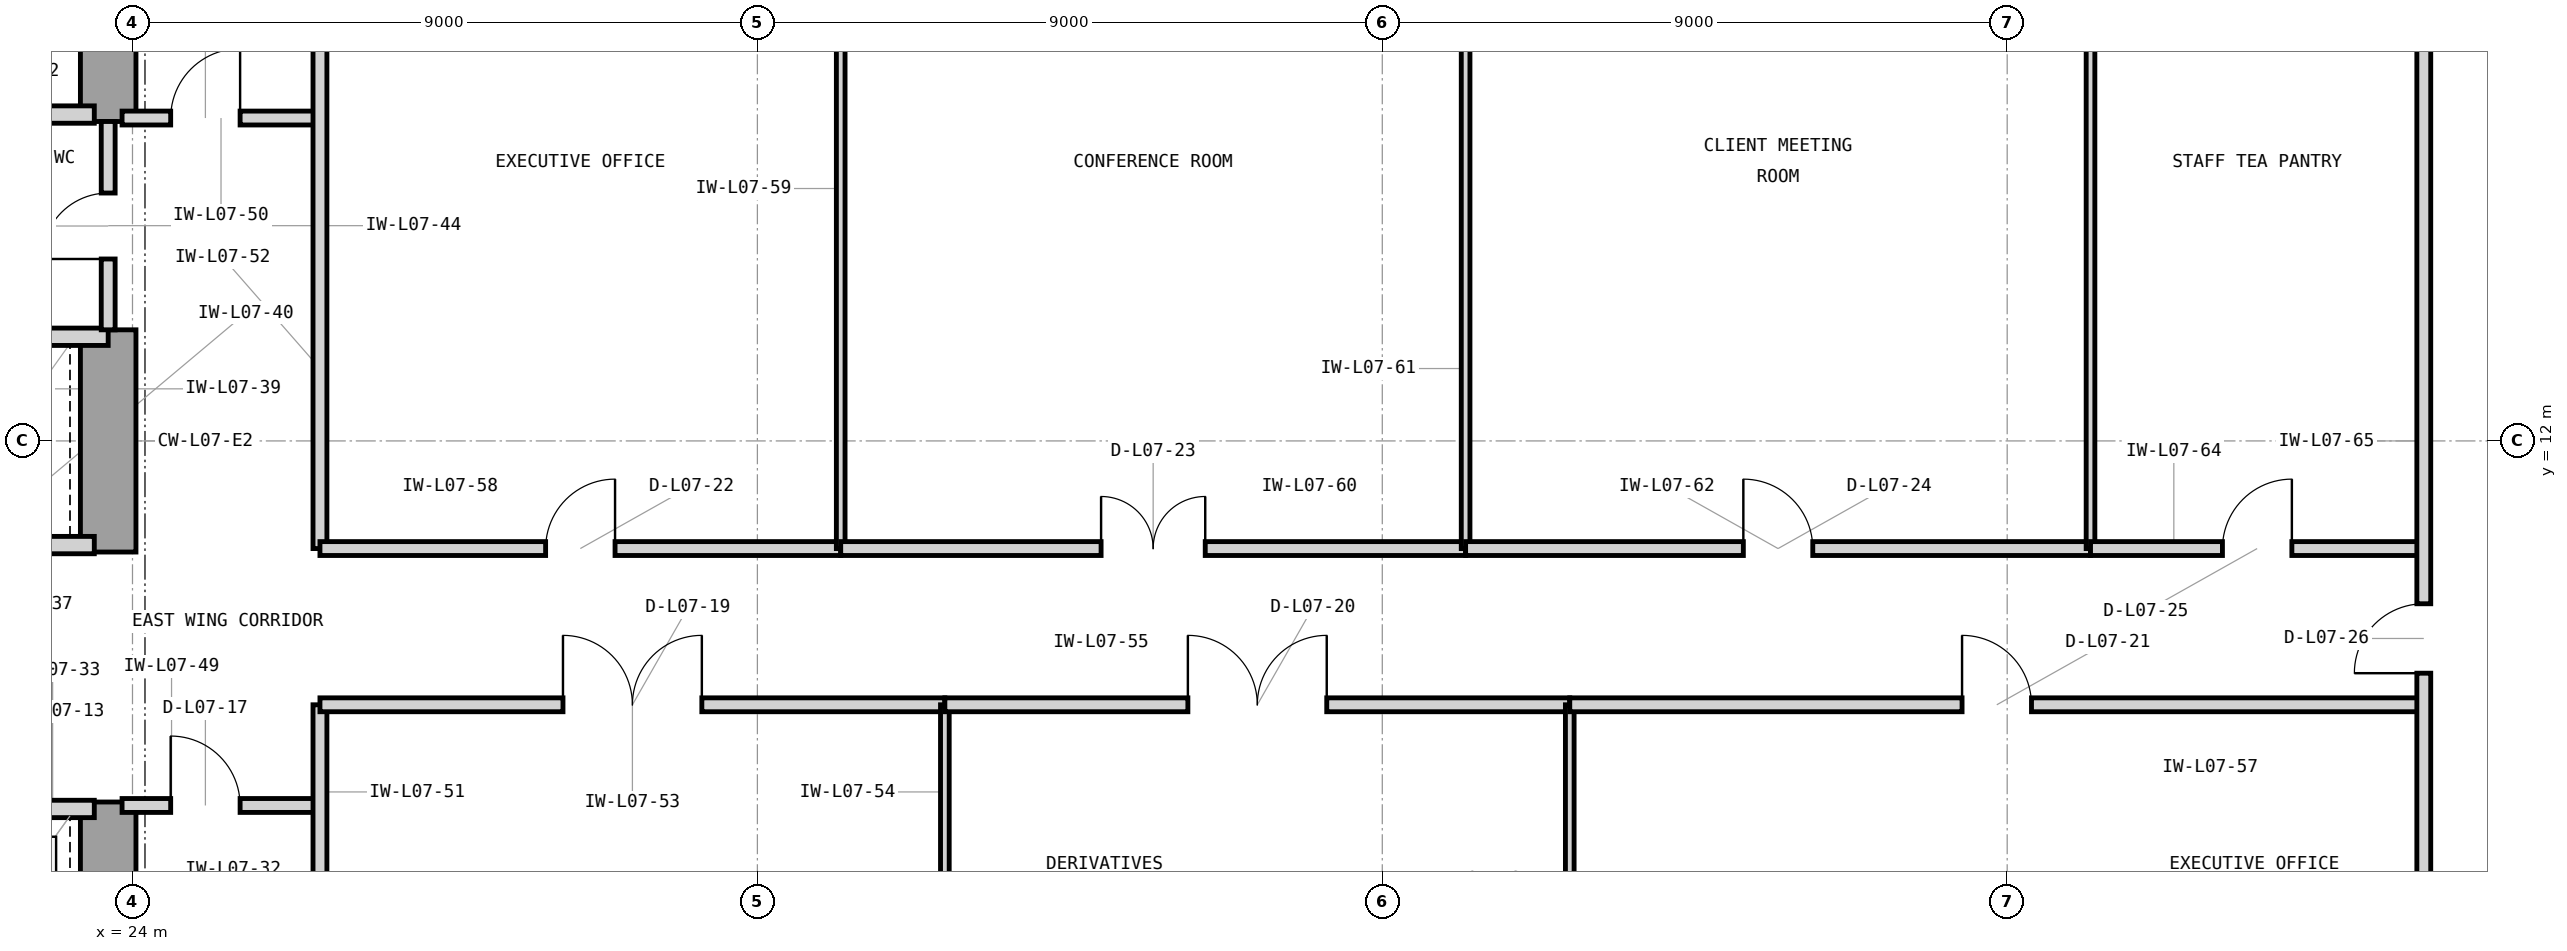
"""IFC4 building model, lengths in metres.
Left out: names, types, materials, properties, quantities, classifications, styles, units other than length and angle.
Written with IfcOpenShell. Run it as: python <this file> out.ifc"""

import sys

from ifc_helpers import new_model, si_unit, direction, frame, frame_2d, origin, place, context, subcontext, project, spatial, rectangle, extrude, element, fill, save


model = new_model("IFC4")
c1 = context("Model", 3, precision=1e-05, world=origin(), true_north=direction((0.0, 1.0)))
c2 = subcontext(c1, "Body", "Model", "MODEL_VIEW")
j1 = project(units=[si_unit("LENGTHUNIT", "METRE"), si_unit("PLANEANGLEUNIT", "RADIAN")], contexts=[c1])
p1 = place(None, origin())
s1 = spatial("IfcSite", under=j1, at=p1, CompositionType="ELEMENT")
p2 = place(p1, origin())
s2 = spatial("IfcBuilding", under=s1, at=p2, CompositionType="ELEMENT")
p3 = place(p2, frame((0.0, 0.0, 34.2)))
s3 = spatial("IfcBuildingStorey", under=s2, at=p3, CompositionType="ELEMENT", Elevation=34.2)
p4 = place(p3, frame((23.65, 3.75, 0.0), z_axis=(0.0, 0.0, 1.0), x_axis=(0.0, 1.0, 0.0)))
e1 = element("IfcWall", 1, at=p4, inside=s3, PredefinedType="SHEAR", context=c2, shape_type="SweptSolid", body=[
    extrude(rectangle(XDim=3.05, YDim=0.8, at=frame_2d((1.525, 0.0))), origin(), (0.0, 0.0, 1.0), 4.2),
])
p5 = place(p3, frame((23.65, 10.4, 0.0), z_axis=(0.0, 0.0, 1.0), x_axis=(0.0, 1.0, 0.0)))
e2 = element("IfcWall", 2, at=p5, inside=s3, PredefinedType="SHEAR", context=c2, shape_type="SweptSolid", body=[
    extrude(rectangle(XDim=3.2, YDim=0.8, at=frame_2d((1.6, 0.0))), origin(), (0.0, 0.0, 1.0), 4.2),
])
p6 = place(p3, frame((23.65, 16.6, 0.0), z_axis=(0.0, 0.0, 1.0), x_axis=(0.0, 1.0, 0.0)))
e3 = element("IfcWall", 3, at=p6, inside=s3, PredefinedType="SHEAR", context=c2, shape_type="SweptSolid", body=[
    extrude(rectangle(XDim=4.05, YDim=0.8, at=frame_2d((2.025, 0.0))), origin(), (0.0, 0.0, 1.0), 4.2),
])
p7 = place(p3, frame((21.05, 16.7, 0.0), z_axis=(0.0, 0.0, 1.0), x_axis=(1.0, 0.0, 0.0)))
e4 = element("IfcWall", 4, at=p7, inside=s3, PredefinedType="PARTITIONING", context=c2, shape_type="SweptSolid", body=[
    extrude(rectangle(XDim=2.4, YDim=0.25, at=frame_2d((1.2, 0.0))), origin(), (0.0, 0.0, 1.0), 3.426),
])
p8 = place(p3, frame((21.05, 6.7, 0.0), z_axis=(0.0, 0.0, 1.0), x_axis=(1.0, 0.0, 0.0)))
e5 = element("IfcWall", 5, at=p8, inside=s3, PredefinedType="PARTITIONING", context=c2, shape_type="SweptSolid", body=[
    extrude(rectangle(XDim=2.4, YDim=0.25, at=frame_2d((1.2, 0.0))), origin(), (0.0, 0.0, 1.0), 3.426),
])
p9 = place(p8, frame((0.48, 0.0, 0.0)))
e6 = element("IfcOpeningElement", 6, at=p9, cuts=e5, PredefinedType="OPENING", context=c2, shape_type="SweptSolid", body=[
    extrude(rectangle(XDim=1.15, YDim=2.25, at=frame_2d((0.575, 1.125))), frame((0.0, 0.135, 0.0), z_axis=(0.0, -1.0, 0.0), x_axis=(1.0, 0.0, 0.0)), (0.0, 0.0, 1.0), 0.27),
])
p10 = place(p3, frame((21.05, 10.5, 0.0), z_axis=(0.0, 0.0, 1.0), x_axis=(1.0, 0.0, 0.0)))
e7 = element("IfcWall", 7, at=p10, inside=s3, PredefinedType="PARTITIONING", context=c2, shape_type="SweptSolid", body=[
    extrude(rectangle(XDim=2.4, YDim=0.25, at=frame_2d((1.2, 0.0))), origin(), (0.0, 0.0, 1.0), 3.426),
])
p11 = place(p3, frame((14.7, 13.5, 0.0), z_axis=(0.0, 0.0, 1.0), x_axis=(1.0, 0.0, 0.0)))
e8 = element("IfcWall", 8, at=p11, inside=s3, PredefinedType="PARTITIONING", context=c2, shape_type="SweptSolid", body=[
    extrude(rectangle(XDim=8.95, YDim=0.25, at=frame_2d((4.475, 0.0))), origin(), (0.0, 0.0, 1.0), 3.426),
])
p12 = place(p3, frame((23.65, 13.6, 0.0), z_axis=(0.0, 0.0, 1.0), x_axis=(0.0, 1.0, 0.0)))
e9 = element("IfcWall", 9, at=p12, inside=s3, PredefinedType="PARTITIONING", context=c2, shape_type="SweptSolid", body=[
    extrude(rectangle(XDim=3.0, YDim=0.2, at=frame_2d((1.5, 0.0))), origin(), (0.0, 0.0, 1.0), 3.97),
])
p13 = place(p12, frame((1.02, 0.0, 0.0)))
e10 = element("IfcOpeningElement", 10, at=p13, cuts=e9, PredefinedType="OPENING", context=c2, shape_type="SweptSolid", body=[
    extrude(rectangle(XDim=0.95, YDim=2.1, at=frame_2d((0.475, 1.05))), frame((0.0, 0.11, 0.0), z_axis=(0.0, -1.0, 0.0), x_axis=(1.0, 0.0, 0.0)), (0.0, 0.0, 1.0), 0.22),
])
p14 = place(p3, frame((23.85, 6.75, 0.0), z_axis=(0.0, 0.0, 1.0), x_axis=(1.0, 0.0, 0.0)))
e11 = element("IfcWall", 11, at=p14, inside=s3, PredefinedType="PARTITIONING", context=c2, shape_type="SweptSolid", body=[
    extrude(rectangle(XDim=2.85, YDim=0.2, at=frame_2d((1.425, 0.0))), origin(), (0.0, 0.0, 1.0), 3.97),
])
p15 = place(p14, frame((0.7, 0.0, 0.0)))
e12 = element("IfcOpeningElement", 12, at=p15, cuts=e11, PredefinedType="OPENING", context=c2, shape_type="SweptSolid", body=[
    extrude(rectangle(XDim=1.0, YDim=2.15, at=frame_2d((0.5, 1.075))), frame((0.0, 0.11, 0.0), z_axis=(0.0, -1.0, 0.0), x_axis=(1.0, 0.0, 0.0)), (0.0, 0.0, 1.0), 0.22),
])
p16 = place(p3, frame((23.85, 16.65, 0.0), z_axis=(0.0, 0.0, 1.0), x_axis=(1.0, 0.0, 0.0)))
e13 = element("IfcWall", 13, at=p16, inside=s3, PredefinedType="PARTITIONING", context=c2, shape_type="SweptSolid", body=[
    extrude(rectangle(XDim=2.85, YDim=0.2, at=frame_2d((1.425, 0.0))), origin(), (0.0, 0.0, 1.0), 3.97),
])
p17 = place(p16, frame((0.7, 0.0, 0.0)))
e14 = element("IfcOpeningElement", 14, at=p17, cuts=e13, PredefinedType="OPENING", context=c2, shape_type="SweptSolid", body=[
    extrude(rectangle(XDim=1.0, YDim=2.15, at=frame_2d((0.5, 1.075))), frame((0.0, 0.11, 0.0), z_axis=(0.0, -1.0, 0.0), x_axis=(1.0, 0.0, 0.0)), (0.0, 0.0, 1.0), 0.22),
])
p18 = place(p3, frame((26.7, 3.18, 0.0), z_axis=(0.0, 0.0, 1.0), x_axis=(0.0, 1.0, 0.0)))
e15 = element("IfcWall", 15, at=p18, inside=s3, PredefinedType="PARTITIONING", context=c2, shape_type="SweptSolid", body=[
    extrude(rectangle(XDim=5.02, YDim=0.2, at=frame_2d((2.51, 0.0))), origin(), (0.0, 0.0, 1.0), 3.97),
])
p19 = place(p3, frame((26.7, 10.45, 0.0), z_axis=(0.0, 0.0, 1.0), x_axis=(0.0, 1.0, 0.0)))
e16 = element("IfcWall", 16, at=p19, inside=s3, PredefinedType="PARTITIONING", context=c2, shape_type="SweptSolid", body=[
    extrude(rectangle(XDim=10.37, YDim=0.2, at=frame_2d((5.185, 0.0))), origin(), (0.0, 0.0, 1.0), 3.97),
])
p20 = place(p3, frame((26.7, 8.2, 0.0), z_axis=(0.0, 0.0, 1.0), x_axis=(1.0, 0.0, 0.0)))
e17 = element("IfcWall", 17, at=p20, inside=s3, PredefinedType="PARTITIONING", context=c2, shape_type="SweptSolid", body=[
    extrude(rectangle(XDim=9.0, YDim=0.2, at=frame_2d((4.5, 0.0))), origin(), (0.0, 0.0, 1.0), 3.97),
])
p21 = place(p20, frame((3.5, 0.0, 0.0)))
e18 = element("IfcOpeningElement", 18, at=p21, cuts=e17, PredefinedType="OPENING", context=c2, shape_type="SweptSolid", body=[
    extrude(rectangle(XDim=2.0, YDim=2.5, at=frame_2d((1.0, 1.25))), frame((0.0, 0.11, 0.0), z_axis=(0.0, -1.0, 0.0), x_axis=(1.0, 0.0, 0.0)), (0.0, 0.0, 1.0), 0.22),
])
p22 = place(p3, frame((35.7, 3.18, 0.0), z_axis=(0.0, 0.0, 1.0), x_axis=(0.0, 1.0, 0.0)))
e19 = element("IfcWall", 19, at=p22, inside=s3, PredefinedType="PARTITIONING", context=c2, shape_type="SweptSolid", body=[
    extrude(rectangle(XDim=5.02, YDim=0.125, at=frame_2d((2.51, 0.0))), origin(), (0.0, 0.0, 1.0), 3.97),
])
p23 = place(p3, frame((35.7, 8.2, 0.0), z_axis=(0.0, 0.0, 1.0), x_axis=(1.0, 0.0, 0.0)))
e20 = element("IfcWall", 20, at=p23, inside=s3, PredefinedType="PARTITIONING", context=c2, shape_type="SweptSolid", body=[
    extrude(rectangle(XDim=9.0, YDim=0.2, at=frame_2d((4.5, 0.0))), origin(), (0.0, 0.0, 1.0), 3.97),
])
p24 = place(p23, frame((3.5, 0.0, 0.0)))
e21 = element("IfcOpeningElement", 21, at=p24, cuts=e20, PredefinedType="OPENING", context=c2, shape_type="SweptSolid", body=[
    extrude(rectangle(XDim=2.0, YDim=2.5, at=frame_2d((1.0, 1.25))), frame((0.0, 0.11, 0.0), z_axis=(0.0, -1.0, 0.0), x_axis=(1.0, 0.0, 0.0)), (0.0, 0.0, 1.0), 0.22),
])
p25 = place(p3, frame((44.7, 3.18, 0.0), z_axis=(0.0, 0.0, 1.0), x_axis=(0.0, 1.0, 0.0)))
e22 = element("IfcWall", 22, at=p25, inside=s3, PredefinedType="PARTITIONING", context=c2, shape_type="SweptSolid", body=[
    extrude(rectangle(XDim=5.02, YDim=0.125, at=frame_2d((2.51, 0.0))), origin(), (0.0, 0.0, 1.0), 3.97),
])
p26 = place(p3, frame((44.7, 8.2, 0.0), z_axis=(0.0, 0.0, 1.0), x_axis=(1.0, 0.0, 0.0)))
e23 = element("IfcWall", 23, at=p26, inside=s3, PredefinedType="PARTITIONING", context=c2, shape_type="SweptSolid", body=[
    extrude(rectangle(XDim=12.3, YDim=0.2, at=frame_2d((6.15, 0.0))), origin(), (0.0, 0.0, 1.0), 3.97),
])
p27 = place(p26, frame((5.65, 0.0, 0.0)))
e24 = element("IfcOpeningElement", 24, at=p27, cuts=e23, PredefinedType="OPENING", context=c2, shape_type="SweptSolid", body=[
    extrude(rectangle(XDim=1.0, YDim=2.15, at=frame_2d((0.5, 1.075))), frame((0.0, 0.11, 0.0), z_axis=(0.0, -1.0, 0.0), x_axis=(1.0, 0.0, 0.0)), (0.0, 0.0, 1.0), 0.22),
])
p28 = place(p3, frame((26.7, 10.45, 0.0), z_axis=(0.0, 0.0, 1.0), x_axis=(1.0, 0.0, 0.0)))
e25 = element("IfcWall", 25, at=p28, inside=s3, PredefinedType="PARTITIONING", context=c2, shape_type="SweptSolid", body=[
    extrude(rectangle(XDim=7.5, YDim=0.2, at=frame_2d((3.75, 0.0))), origin(), (0.0, 0.0, 1.0), 3.97),
])
p29 = place(p28, frame((3.25, 0.0, 0.0)))
e26 = element("IfcOpeningElement", 26, at=p29, cuts=e25, PredefinedType="OPENING", context=c2, shape_type="SweptSolid", body=[
    extrude(rectangle(XDim=1.0, YDim=2.15, at=frame_2d((0.5, 1.075))), frame((0.0, 0.11, 0.0), z_axis=(0.0, -1.0, 0.0), x_axis=(1.0, 0.0, 0.0)), (0.0, 0.0, 1.0), 0.22),
])
p30 = place(p3, frame((34.2, 10.45, 0.0), z_axis=(0.0, 0.0, 1.0), x_axis=(0.0, 1.0, 0.0)))
e27 = element("IfcWall", 27, at=p30, inside=s3, PredefinedType="PARTITIONING", context=c2, shape_type="SweptSolid", body=[
    extrude(rectangle(XDim=10.37, YDim=0.125, at=frame_2d((5.185, 0.0))), origin(), (0.0, 0.0, 1.0), 3.97),
])
p31 = place(p3, frame((34.2, 10.45, 0.0), z_axis=(0.0, 0.0, 1.0), x_axis=(1.0, 0.0, 0.0)))
e28 = element("IfcWall", 28, at=p31, inside=s3, PredefinedType="PARTITIONING", context=c2, shape_type="SweptSolid", body=[
    extrude(rectangle(XDim=9.0, YDim=0.2, at=frame_2d((4.5, 0.0))), origin(), (0.0, 0.0, 1.0), 3.97),
])
p32 = place(p31, frame((3.75, 0.0, 0.0)))
e29 = element("IfcOpeningElement", 29, at=p32, cuts=e28, PredefinedType="OPENING", context=c2, shape_type="SweptSolid", body=[
    extrude(rectangle(XDim=1.5, YDim=2.3, at=frame_2d((0.75, 1.15))), frame((0.0, 0.11, 0.0), z_axis=(0.0, -1.0, 0.0), x_axis=(1.0, 0.0, 0.0)), (0.0, 0.0, 1.0), 0.22),
])
p33 = place(p3, frame((43.2, 10.45, 0.0), z_axis=(0.0, 0.0, 1.0), x_axis=(0.0, 1.0, 0.0)))
e30 = element("IfcWall", 30, at=p33, inside=s3, PredefinedType="PARTITIONING", context=c2, shape_type="SweptSolid", body=[
    extrude(rectangle(XDim=10.37, YDim=0.125, at=frame_2d((5.185, 0.0))), origin(), (0.0, 0.0, 1.0), 3.97),
])
p34 = place(p3, frame((43.2, 10.45, 0.0), z_axis=(0.0, 0.0, 1.0), x_axis=(1.0, 0.0, 0.0)))
e31 = element("IfcWall", 31, at=p34, inside=s3, PredefinedType="PARTITIONING", context=c2, shape_type="SweptSolid", body=[
    extrude(rectangle(XDim=9.0, YDim=0.2, at=frame_2d((4.5, 0.0))), origin(), (0.0, 0.0, 1.0), 3.97),
])
p35 = place(p34, frame((4.0, 0.0, 0.0)))
e32 = element("IfcOpeningElement", 32, at=p35, cuts=e31, PredefinedType="OPENING", context=c2, shape_type="SweptSolid", body=[
    extrude(rectangle(XDim=1.0, YDim=2.15, at=frame_2d((0.5, 1.075))), frame((0.0, 0.11, 0.0), z_axis=(0.0, -1.0, 0.0), x_axis=(1.0, 0.0, 0.0)), (0.0, 0.0, 1.0), 0.22),
])
p36 = place(p3, frame((52.2, 10.45, 0.0), z_axis=(0.0, 0.0, 1.0), x_axis=(0.0, 1.0, 0.0)))
e33 = element("IfcWall", 33, at=p36, inside=s3, PredefinedType="PARTITIONING", context=c2, shape_type="SweptSolid", body=[
    extrude(rectangle(XDim=10.37, YDim=0.125, at=frame_2d((5.185, 0.0))), origin(), (0.0, 0.0, 1.0), 3.97),
])
p37 = place(p3, frame((52.2, 10.45, 0.0), z_axis=(0.0, 0.0, 1.0), x_axis=(1.0, 0.0, 0.0)))
e34 = element("IfcWall", 34, at=p37, inside=s3, PredefinedType="PARTITIONING", context=c2, shape_type="SweptSolid", body=[
    extrude(rectangle(XDim=4.8, YDim=0.2, at=frame_2d((2.4, 0.0))), origin(), (0.0, 0.0, 1.0), 3.97),
])
p38 = place(p37, frame((1.9, 0.0, 0.0)))
e35 = element("IfcOpeningElement", 35, at=p38, cuts=e34, PredefinedType="OPENING", context=c2, shape_type="SweptSolid", body=[
    extrude(rectangle(XDim=1.0, YDim=2.15, at=frame_2d((0.5, 1.075))), frame((0.0, 0.11, 0.0), z_axis=(0.0, -1.0, 0.0), x_axis=(1.0, 0.0, 0.0)), (0.0, 0.0, 1.0), 0.22),
])
p39 = place(p3, frame((57.0, 3.18, 0.0), z_axis=(0.0, 0.0, 1.0), x_axis=(0.0, 1.0, 0.0)))
e36 = element("IfcWall", 36, at=p39, inside=s3, PredefinedType="PARTITIONING", context=c2, shape_type="SweptSolid", body=[
    extrude(rectangle(XDim=17.64, YDim=0.2, at=frame_2d((8.82, 0.0))), origin(), (0.0, 0.0, 1.0), 3.114),
])
p40 = place(p39, frame((5.475, 0.0, 0.0)))
e37 = element("IfcOpeningElement", 37, at=p40, cuts=e36, PredefinedType="OPENING", context=c2, shape_type="SweptSolid", body=[
    extrude(rectangle(XDim=1.0, YDim=2.15, at=frame_2d((0.5, 1.075))), frame((0.0, 0.11, 0.0), z_axis=(0.0, -1.0, 0.0), x_axis=(1.0, 0.0, 0.0)), (0.0, 0.0, 1.0), 0.22),
])
p41 = place(p13, origin())
e38 = element("IfcDoor", 38, at=p41, inside=s3, OperationType="SINGLE_SWING_LEFT", PredefinedType="DOOR", context=c2, shape_type="SweptSolid", body=[
    extrude(rectangle(XDim=0.95, YDim=2.1, at=frame_2d((0.475, 1.05))), frame((0.0, 0.025, 0.0), z_axis=(0.0, -1.0, 0.0), x_axis=(1.0, 0.0, 0.0)), (0.0, 0.0, 1.0), 0.05),
])
fill(e10, e38)
p42 = place(p15, origin())
e39 = element("IfcDoor", 39, at=p42, inside=s3, OperationType="SINGLE_SWING_LEFT", PredefinedType="DOOR", context=c2, shape_type="SweptSolid", body=[
    extrude(rectangle(XDim=1.0, YDim=2.15, at=frame_2d((0.5, 1.075))), frame((0.0, 0.025, 0.0), z_axis=(0.0, -1.0, 0.0), x_axis=(1.0, 0.0, 0.0)), (0.0, 0.0, 1.0), 0.05),
])
fill(e12, e39)
p43 = place(p17, origin())
e40 = element("IfcDoor", 40, at=p43, inside=s3, OperationType="SINGLE_SWING_RIGHT", PredefinedType="DOOR", context=c2, shape_type="SweptSolid", body=[
    extrude(rectangle(XDim=1.0, YDim=2.15, at=frame_2d((0.5, 1.075))), frame((0.0, 0.025, 0.0), z_axis=(0.0, -1.0, 0.0), x_axis=(1.0, 0.0, 0.0)), (0.0, 0.0, 1.0), 0.05),
])
fill(e14, e40)
p44 = place(p21, origin())
e41 = element("IfcDoor", 41, at=p44, inside=s3, OperationType="DOUBLE_DOOR_SINGLE_SWING", PredefinedType="DOOR", context=c2, shape_type="SweptSolid", body=[
    extrude(rectangle(XDim=2.0, YDim=2.5, at=frame_2d((1.0, 1.25))), frame((0.0, 0.025, 0.0), z_axis=(0.0, -1.0, 0.0), x_axis=(1.0, 0.0, 0.0)), (0.0, 0.0, 1.0), 0.05),
])
fill(e18, e41)
p45 = place(p24, origin())
e42 = element("IfcDoor", 42, at=p45, inside=s3, OperationType="DOUBLE_DOOR_SINGLE_SWING", PredefinedType="DOOR", context=c2, shape_type="SweptSolid", body=[
    extrude(rectangle(XDim=2.0, YDim=2.5, at=frame_2d((1.0, 1.25))), frame((0.0, 0.025, 0.0), z_axis=(0.0, -1.0, 0.0), x_axis=(1.0, 0.0, 0.0)), (0.0, 0.0, 1.0), 0.05),
])
fill(e21, e42)
p46 = place(p27, origin())
e43 = element("IfcDoor", 43, at=p46, inside=s3, OperationType="SINGLE_SWING_LEFT", PredefinedType="DOOR", context=c2, shape_type="SweptSolid", body=[
    extrude(rectangle(XDim=1.0, YDim=2.15, at=frame_2d((0.5, 1.075))), frame((0.0, 0.025, 0.0), z_axis=(0.0, -1.0, 0.0), x_axis=(1.0, 0.0, 0.0)), (0.0, 0.0, 1.0), 0.05),
])
fill(e24, e43)
p47 = place(p29, origin())
e44 = element("IfcDoor", 44, at=p47, inside=s3, OperationType="SINGLE_SWING_RIGHT", PredefinedType="DOOR", context=c2, shape_type="SweptSolid", body=[
    extrude(rectangle(XDim=1.0, YDim=2.15, at=frame_2d((0.5, 1.075))), frame((0.0, 0.025, 0.0), z_axis=(0.0, -1.0, 0.0), x_axis=(1.0, 0.0, 0.0)), (0.0, 0.0, 1.0), 0.05),
])
fill(e26, e44)
p48 = place(p32, origin())
e45 = element("IfcDoor", 45, at=p48, inside=s3, OperationType="DOUBLE_DOOR_SINGLE_SWING", PredefinedType="DOOR", context=c2, shape_type="SweptSolid", body=[
    extrude(rectangle(XDim=1.5, YDim=2.3, at=frame_2d((0.75, 1.15))), frame((0.0, 0.025, 0.0), z_axis=(0.0, -1.0, 0.0), x_axis=(1.0, 0.0, 0.0)), (0.0, 0.0, 1.0), 0.05),
])
fill(e29, e45)
p49 = place(p35, origin())
e46 = element("IfcDoor", 46, at=p49, inside=s3, OperationType="SINGLE_SWING_LEFT", PredefinedType="DOOR", context=c2, shape_type="SweptSolid", body=[
    extrude(rectangle(XDim=1.0, YDim=2.15, at=frame_2d((0.5, 1.075))), frame((0.0, 0.025, 0.0), z_axis=(0.0, -1.0, 0.0), x_axis=(1.0, 0.0, 0.0)), (0.0, 0.0, 1.0), 0.05),
])
fill(e32, e46)
p50 = place(p38, origin())
e47 = element("IfcDoor", 47, at=p50, inside=s3, OperationType="SINGLE_SWING_RIGHT", PredefinedType="DOOR", context=c2, shape_type="SweptSolid", body=[
    extrude(rectangle(XDim=1.0, YDim=2.15, at=frame_2d((0.5, 1.075))), frame((0.0, 0.025, 0.0), z_axis=(0.0, -1.0, 0.0), x_axis=(1.0, 0.0, 0.0)), (0.0, 0.0, 1.0), 0.05),
])
fill(e35, e47)
p51 = place(p40, origin())
e48 = element("IfcDoor", 48, at=p51, inside=s3, OperationType="SINGLE_SWING_LEFT", PredefinedType="DOOR", context=c2, shape_type="SweptSolid", body=[
    extrude(rectangle(XDim=1.0, YDim=2.15, at=frame_2d((0.5, 1.075))), frame((0.0, 0.025, 0.0), z_axis=(0.0, -1.0, 0.0), x_axis=(1.0, 0.0, 0.0)), (0.0, 0.0, 1.0), 0.05),
])
fill(e37, e48)
save(model, sys.argv[1])
